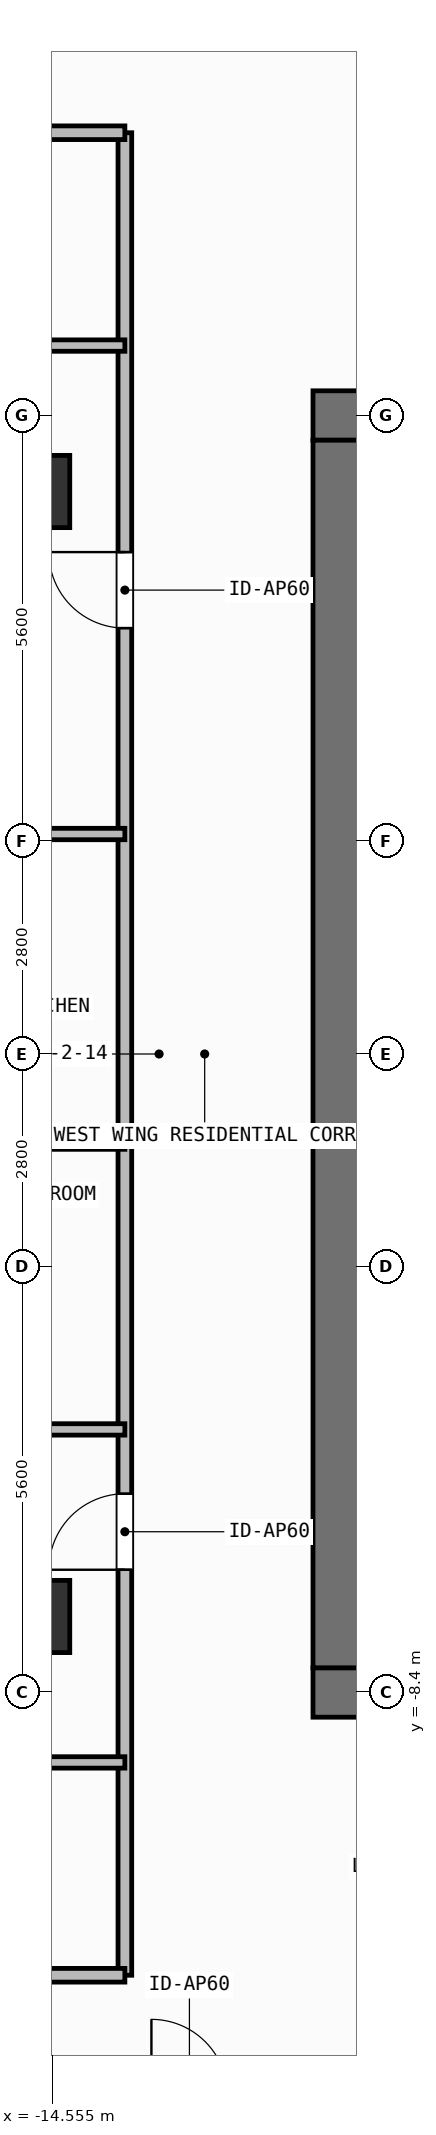
"""IFC4 building model, lengths in metres.
Left out: names, types, materials, properties, quantities, classifications, styles, units other than length and angle.
Written with IfcOpenShell. Run it as: python <this file> out.ifc"""

import sys

from ifc_helpers import new_model, si_unit, direction, frame, frame_2d, origin, origin_2d, place, context, subcontext, project, spatial, rectangle, extrude, element, fill, save


model = new_model("IFC4")
c1 = context("Model", 3, precision=1e-05, world=origin(), true_north=direction((0.0, 1.0)))
c2 = subcontext(c1, "Body", "Model", "MODEL_VIEW")
j1 = project(units=[si_unit("LENGTHUNIT", "METRE"), si_unit("PLANEANGLEUNIT", "RADIAN")], contexts=[c1])
p1 = place(None, origin())
s1 = spatial("IfcSite", under=j1, at=p1, CompositionType="ELEMENT")
p2 = place(p1, origin())
s2 = spatial("IfcBuilding", under=s1, at=p2, CompositionType="ELEMENT")
p3 = place(p2, frame((0.0, 0.0, 289.8)))
s3 = spatial("IfcBuildingStorey", under=s2, at=p3, CompositionType="ELEMENT", Elevation=289.8)
for number, where, z_axis, x_axis in (
    (1, (-11.125, -8.4, 0.0), (0.0, 0.0, 1.0), (1.0, 0.0, 0.0)),
    (2, (-11.125, 8.4, 0.0), (0.0, 0.0, 1.0), (1.0, 0.0, 0.0)),
):
    element("IfcWall", number, at=place(p3, frame(where, z_axis=z_axis, x_axis=x_axis)), inside=s3, PredefinedType="SHEAR", context=c2, shape_type="SweptSolid", body=[
        extrude(rectangle(XDim=1.425, YDim=0.65, at=frame_2d((0.712, 0.0))), origin(), (0.0, 0.0, 1.0), 3.9),
    ])
p4 = place(p3, frame((-10.8, -8.075, 0.0), z_axis=(0.0, 0.0, 1.0), x_axis=(0.0, 1.0, 0.0)))
e3 = element("IfcWall", 3, at=p4, inside=s3, PredefinedType="SHEAR", context=c2, shape_type="SweptSolid", body=[
    extrude(rectangle(XDim=16.15, YDim=0.65, at=frame_2d((8.075, 0.0))), origin(), (0.0, 0.0, 1.0), 3.9),
])
for number, where, z_axis, x_axis in (
    (4, (-14.8, -7.4, 0.0), (0.0, 0.0, 1.0), (1.0, 0.0, 0.0)),
    (5, (-14.8, 7.4, 0.0), (0.0, 0.0, 1.0), (1.0, 0.0, 0.0)),
):
    element("IfcColumn", number, at=place(p3, frame(where, z_axis=z_axis, x_axis=x_axis)), inside=s3, PredefinedType="COLUMN", context=c2, shape_type="SweptSolid", body=[
        extrude(rectangle(XDim=0.95, YDim=0.95, at=origin_2d()), origin(), (0.0, 0.0, 1.0), 3.9),
    ])
p5 = place(p3, frame((-13.6, -12.12, 0.0), z_axis=(0.0, 0.0, 1.0), x_axis=(0.0, 1.0, 0.0)))
e6 = element("IfcWall", 6, at=p5, inside=s3, PredefinedType="PARTITIONING", context=c2, shape_type="SweptSolid", body=[
    extrude(rectangle(XDim=10.956, YDim=0.18, at=frame_2d((5.478, 0.0))), origin(), (0.0, 0.0, 1.0), 3.68),
])
p6 = place(p5, frame((5.335, 0.0, 0.0)))
e7 = element("IfcOpeningElement", 7, at=p6, cuts=e6, PredefinedType="OPENING", context=c2, shape_type="SweptSolid", body=[
    extrude(rectangle(XDim=1.0, YDim=2.2, at=frame_2d((0.5, 1.1))), frame((0.0, 0.1, 0.0), z_axis=(0.0, -1.0, 0.0), x_axis=(1.0, 0.0, 0.0)), (0.0, 0.0, 1.0), 0.2),
])
p7 = place(p3, frame((-16.809, -4.939, 0.0), z_axis=(0.0, 0.0, 1.0), x_axis=(1.0, 0.0, 0.0)))
e8 = element("IfcWall", 8, at=p7, inside=s3, PredefinedType="PARTITIONING", context=c2, shape_type="SweptSolid", body=[
    extrude(rectangle(XDim=3.209, YDim=0.15, at=frame_2d((1.604, 0.0))), origin(), (0.0, 0.0, 1.0), 3.68),
])
p8 = place(p7, frame((1.179, 0.0, 0.0)))
e9 = element("IfcOpeningElement", 9, at=p8, cuts=e8, PredefinedType="OPENING", context=c2, shape_type="SweptSolid", body=[
    extrude(rectangle(XDim=0.85, YDim=2.1, at=frame_2d((0.425, 1.05))), frame((0.0, 0.085, 0.0), z_axis=(0.0, -1.0, 0.0), x_axis=(1.0, 0.0, 0.0)), (0.0, 0.0, 1.0), 0.17),
])
p9 = place(p3, frame((-16.809, -9.32, 0.0), z_axis=(0.0, 0.0, 1.0), x_axis=(1.0, 0.0, 0.0)))
e10 = element("IfcWall", 10, at=p9, inside=s3, PredefinedType="PARTITIONING", context=c2, shape_type="SweptSolid", body=[
    extrude(rectangle(XDim=3.209, YDim=0.15, at=frame_2d((1.604, 0.0))), origin(), (0.0, 0.0, 1.0), 3.68),
])
p10 = place(p9, frame((1.179, 0.0, 0.0)))
e11 = element("IfcOpeningElement", 11, at=p10, cuts=e10, PredefinedType="OPENING", context=c2, shape_type="SweptSolid", body=[
    extrude(rectangle(XDim=0.85, YDim=2.1, at=frame_2d((0.425, 1.05))), frame((0.0, 0.085, 0.0), z_axis=(0.0, -1.0, 0.0), x_axis=(1.0, 0.0, 0.0)), (0.0, 0.0, 1.0), 0.17),
])
p11 = place(p3, frame((-13.6, -1.164, 0.0), z_axis=(0.0, 0.0, 1.0), x_axis=(0.0, 1.0, 0.0)))
e12 = element("IfcWall", 12, at=p11, inside=s3, PredefinedType="PARTITIONING", context=c2, shape_type="SweptSolid", body=[
    extrude(rectangle(XDim=13.284, YDim=0.18, at=frame_2d((6.642, 0.0))), origin(), (0.0, 0.0, 1.0), 3.68),
])
p12 = place(p11, frame((6.767, 0.0, 0.0)))
e13 = element("IfcOpeningElement", 13, at=p12, cuts=e12, PredefinedType="OPENING", context=c2, shape_type="SweptSolid", body=[
    extrude(rectangle(XDim=1.0, YDim=2.2, at=frame_2d((0.5, 1.1))), frame((0.0, 0.1, 0.0), z_axis=(0.0, -1.0, 0.0), x_axis=(1.0, 0.0, 0.0)), (0.0, 0.0, 1.0), 0.2),
])
p13 = place(p3, frame((-16.809, 9.32, 0.0), z_axis=(0.0, 0.0, 1.0), x_axis=(1.0, 0.0, 0.0)))
e14 = element("IfcWall", 14, at=p13, inside=s3, PredefinedType="PARTITIONING", context=c2, shape_type="SweptSolid", body=[
    extrude(rectangle(XDim=3.209, YDim=0.15, at=frame_2d((1.604, 0.0))), origin(), (0.0, 0.0, 1.0), 3.68),
])
p14 = place(p13, frame((1.179, 0.0, 0.0)))
e15 = element("IfcOpeningElement", 15, at=p14, cuts=e14, PredefinedType="OPENING", context=c2, shape_type="SweptSolid", body=[
    extrude(rectangle(XDim=0.85, YDim=2.1, at=frame_2d((0.425, 1.05))), frame((0.0, 0.085, 0.0), z_axis=(0.0, -1.0, 0.0), x_axis=(1.0, 0.0, 0.0)), (0.0, 0.0, 1.0), 0.17),
])
p15 = place(p3, frame((-16.809, 2.894, 0.0), z_axis=(0.0, 0.0, 1.0), x_axis=(1.0, 0.0, 0.0)))
e16 = element("IfcWall", 16, at=p15, inside=s3, PredefinedType="PARTITIONING", context=c2, shape_type="SweptSolid", body=[
    extrude(rectangle(XDim=3.209, YDim=0.15, at=frame_2d((1.604, 0.0))), origin(), (0.0, 0.0, 1.0), 3.68),
])
p16 = place(p15, frame((1.179, 0.0, 0.0)))
e17 = element("IfcOpeningElement", 17, at=p16, cuts=e16, PredefinedType="OPENING", context=c2, shape_type="SweptSolid", body=[
    extrude(rectangle(XDim=0.85, YDim=2.1, at=frame_2d((0.425, 1.05))), frame((0.0, 0.085, 0.0), z_axis=(0.0, -1.0, 0.0), x_axis=(1.0, 0.0, 0.0)), (0.0, 0.0, 1.0), 0.17),
])
for number, where, z_axis, x_axis in (
    (18, (-22.53, -1.164, 0.0), (0.0, 0.0, 1.0), (1.0, 0.0, 0.0)),
    (19, (-22.53, -12.12, 0.0), (0.0, 0.0, 1.0), (1.0, 0.0, 0.0)),
    (20, (-22.53, 12.12, 0.0), (0.0, 0.0, 1.0), (1.0, 0.0, 0.0)),
):
    element("IfcWall", number, at=place(p3, frame(where, z_axis=z_axis, x_axis=x_axis)), inside=s3, PredefinedType="PARTITIONING", context=c2, shape_type="SweptSolid", body=[
        extrude(rectangle(XDim=8.93, YDim=0.18, at=frame_2d((4.465, 0.0))), origin(), (0.0, 0.0, 1.0), 3.68),
    ])
p17 = place(p6, origin())
e21 = element("IfcDoor", 21, at=p17, inside=s3, OperationType="SINGLE_SWING_LEFT", PredefinedType="DOOR", context=c2, shape_type="SweptSolid", body=[
    extrude(rectangle(XDim=1.0, YDim=2.2, at=frame_2d((0.5, 1.1))), frame((0.0, 0.025, 0.0), z_axis=(0.0, -1.0, 0.0), x_axis=(1.0, 0.0, 0.0)), (0.0, 0.0, 1.0), 0.05),
])
fill(e7, e21)
p18 = place(p12, origin())
e22 = element("IfcDoor", 22, at=p18, inside=s3, OperationType="SINGLE_SWING_RIGHT", PredefinedType="DOOR", context=c2, shape_type="SweptSolid", body=[
    extrude(rectangle(XDim=1.0, YDim=2.2, at=frame_2d((0.5, 1.1))), frame((0.0, 0.025, 0.0), z_axis=(0.0, -1.0, 0.0), x_axis=(1.0, 0.0, 0.0)), (0.0, 0.0, 1.0), 0.05),
])
fill(e13, e22)
save(model, sys.argv[1])
